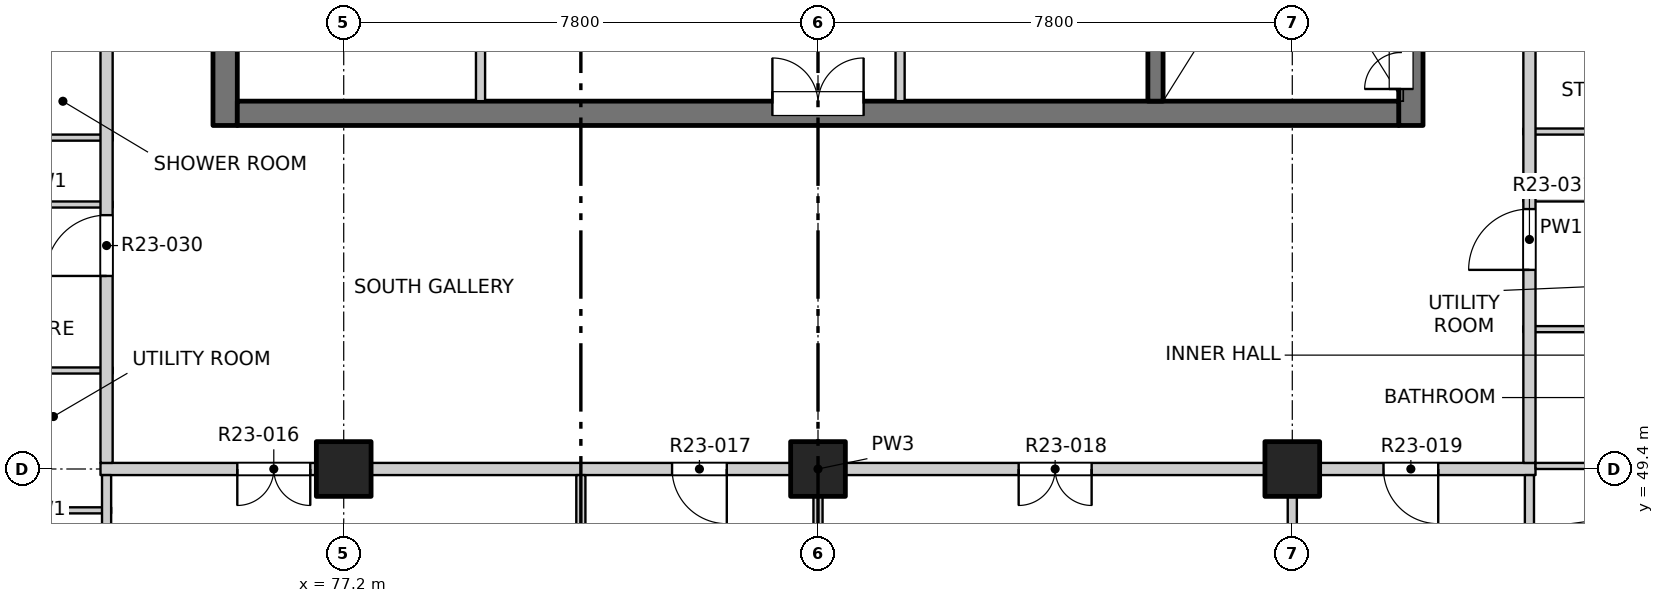
"""IFC4 building model, lengths in metres.
Left out: names, types, materials, properties, quantities, classifications, styles, units other than length and angle.
Written with IfcOpenShell. Run it as: python <this file> out.ifc"""

import sys

from ifc_helpers import new_model, si_unit, direction, frame, frame_2d, origin, origin_2d, place, context, subcontext, project, spatial, rectangle, extrude, element, fill, save


model = new_model("IFC4")
c1 = context("Model", 3, precision=1e-05, world=origin(), true_north=direction((0.0, 1.0)))
c2 = subcontext(c1, "Body", "Model", "MODEL_VIEW")
j1 = project(units=[si_unit("LENGTHUNIT", "METRE"), si_unit("PLANEANGLEUNIT", "RADIAN")], contexts=[c1])
p1 = place(None, origin())
s1 = spatial("IfcSite", under=j1, at=p1, CompositionType="ELEMENT")
p2 = place(p1, origin())
s2 = spatial("IfcBuilding", under=s1, at=p2, CompositionType="ELEMENT")
p3 = place(p2, frame((0.0, 0.0, 238.1)))
s3 = spatial("IfcBuildingStorey", under=s2, at=p3, CompositionType="ELEMENT", Elevation=238.1)
for number, where, z_axis, x_axis in (
    (1, (77.2, 49.4, -0.25), (0.0, 0.0, 1.0), (1.0, 0.0, 0.0)),
    (2, (85.0, 49.4, -0.25), (0.0, 0.0, 1.0), (1.0, 0.0, 0.0)),
    (3, (92.8, 49.4, -0.25), (0.0, 0.0, 1.0), (1.0, 0.0, 0.0)),
):
    element("IfcColumn", number, at=place(p3, frame(where, z_axis=z_axis, x_axis=x_axis)), inside=s3, PredefinedType="COLUMN", context=c2, shape_type="SweptSolid", body=[
        extrude(rectangle(XDim=0.9, YDim=0.9, at=origin_2d()), origin(), (0.0, 0.0, 1.0), 3.35),
    ])
p4 = place(p3, frame((75.25, 55.05, -0.25), z_axis=(0.0, 0.0, 1.0), x_axis=(0.0, 1.0, 0.0)))
e4 = element("IfcWall", 4, at=p4, inside=s3, PredefinedType="SOLIDWALL", context=c2, shape_type="SweptSolid", body=[
    extrude(rectangle(XDim=22.25, YDim=0.4, at=frame_2d((11.125, 0.0))), origin(), (0.0, 0.0, 1.0), 3.35),
])
p5 = place(p4, frame((7.4, 0.0, 0.25)))
e5 = element("IfcOpeningElement", 5, at=p5, cuts=e4, PredefinedType="OPENING", context=c2, shape_type="SweptSolid", body=[
    extrude(rectangle(XDim=0.9, YDim=2.1, at=frame_2d((0.45, 1.05))), frame((0.0, 0.21, 0.0), z_axis=(0.0, -1.0, 0.0), x_axis=(1.0, 0.0, 0.0)), (0.0, 0.0, 1.0), 0.42),
])
p6 = place(p4, frame((12.05, 0.0, 0.25)))
e6 = element("IfcOpeningElement", 6, at=p6, cuts=e4, PredefinedType="OPENING", context=c2, shape_type="SweptSolid", body=[
    extrude(rectangle(XDim=0.9, YDim=2.1, at=frame_2d((0.45, 1.05))), frame((0.0, 0.21, 0.0), z_axis=(0.0, -1.0, 0.0), x_axis=(1.0, 0.0, 0.0)), (0.0, 0.0, 1.0), 0.42),
])
p7 = place(p4, frame((16.55, 0.0, 0.25)))
e7 = element("IfcOpeningElement", 7, at=p7, cuts=e4, PredefinedType="OPENING", context=c2, shape_type="SweptSolid", body=[
    extrude(rectangle(XDim=0.9, YDim=2.1, at=frame_2d((0.45, 1.05))), frame((0.0, 0.21, 0.0), z_axis=(0.0, -1.0, 0.0), x_axis=(1.0, 0.0, 0.0)), (0.0, 0.0, 1.0), 0.42),
])
p8 = place(p4, frame((20.0, 0.0, 0.25)))
e8 = element("IfcOpeningElement", 8, at=p8, cuts=e4, PredefinedType="OPENING", context=c2, shape_type="SweptSolid", body=[
    extrude(rectangle(XDim=0.9, YDim=2.1, at=frame_2d((0.45, 1.05))), frame((0.0, 0.21, 0.0), z_axis=(0.0, -1.0, 0.0), x_axis=(1.0, 0.0, 0.0)), (0.0, 0.0, 1.0), 0.42),
])
p9 = place(p3, frame((94.75, 55.05, -0.25), z_axis=(0.0, 0.0, 1.0), x_axis=(0.0, 1.0, 0.0)))
e9 = element("IfcWall", 9, at=p9, inside=s3, PredefinedType="SOLIDWALL", context=c2, shape_type="SweptSolid", body=[
    extrude(rectangle(XDim=6.9, YDim=0.4, at=frame_2d((3.45, 0.0))), origin(), (0.0, 0.0, 1.0), 3.35),
])
p10 = place(p9, frame((0.6, 0.0, 0.25)))
e10 = element("IfcOpeningElement", 10, at=p10, cuts=e9, PredefinedType="OPENING", context=c2, shape_type="SweptSolid", body=[
    extrude(rectangle(XDim=1.2, YDim=2.1, at=frame_2d((0.6, 1.05))), frame((0.0, 0.21, 0.0), z_axis=(0.0, -1.0, 0.0), x_axis=(1.0, 0.0, 0.0)), (0.0, 0.0, 1.0), 0.42),
])
p11 = place(p3, frame((75.45, 55.25, -0.25), z_axis=(0.0, 0.0, 1.0), x_axis=(1.0, 0.0, 0.0)))
e11 = element("IfcWall", 11, at=p11, inside=s3, PredefinedType="SOLIDWALL", context=c2, shape_type="SweptSolid", body=[
    extrude(rectangle(XDim=19.1, YDim=0.4, at=frame_2d((9.55, 0.0))), origin(), (0.0, 0.0, 1.0), 3.35),
])
p12 = place(p11, frame((8.8, 0.0, 0.25)))
e12 = element("IfcOpeningElement", 12, at=p12, cuts=e11, PredefinedType="OPENING", context=c2, shape_type="SweptSolid", body=[
    extrude(rectangle(XDim=1.5, YDim=2.1, at=frame_2d((0.75, 1.05))), frame((0.0, 0.21, 0.0), z_axis=(0.0, -1.0, 0.0), x_axis=(1.0, 0.0, 0.0)), (0.0, 0.0, 1.0), 0.42),
])
p13 = place(p3, frame((90.55, 55.45, -0.25), z_axis=(0.0, 0.0, 1.0), x_axis=(0.0, 1.0, 0.0)))
e13 = element("IfcWall", 13, at=p13, inside=s3, PredefinedType="SOLIDWALL", context=c2, shape_type="SweptSolid", body=[
    extrude(rectangle(XDim=6.5, YDim=0.25, at=frame_2d((3.25, 0.0))), origin(), (0.0, 0.0, 1.0), 3.35),
])
p14 = place(p3, frame((71.18, 48.72, 0.0), z_axis=(0.0, 0.0, 1.0), x_axis=(1.0, 0.0, 0.0)))
e14 = element("IfcWall", 14, at=p14, inside=s3, PredefinedType="PARTITIONING", context=c2, shape_type="SweptSolid", body=[
    extrude(rectangle(XDim=2.195, YDim=0.1, at=frame_2d((1.097, 0.0))), origin(), (0.0, 0.0, 1.0), 3.1),
])
p15 = place(p3, frame((73.2, 49.4, 0.0), z_axis=(0.0, 0.0, 1.0), x_axis=(1.0, 0.0, 0.0)))
e15 = element("IfcWall", 15, at=p15, inside=s3, PredefinedType="PARTITIONING", context=c2, shape_type="SweptSolid", body=[
    extrude(rectangle(XDim=23.6, YDim=0.2, at=frame_2d((11.8, 0.0))), origin(), (0.0, 0.0, 1.0), 3.1),
])
p16 = place(p15, frame((2.25, 0.0, 0.0)))
e16 = element("IfcOpeningElement", 16, at=p16, cuts=e15, PredefinedType="OPENING", context=c2, shape_type="SweptSolid", body=[
    extrude(rectangle(XDim=1.2, YDim=2.1, at=frame_2d((0.6, 1.05))), frame((0.0, 0.11, 0.0), z_axis=(0.0, -1.0, 0.0), x_axis=(1.0, 0.0, 0.0)), (0.0, 0.0, 1.0), 0.22),
])
p17 = place(p15, frame((9.4, 0.0, 0.0)))
e17 = element("IfcOpeningElement", 17, at=p17, cuts=e15, PredefinedType="OPENING", context=c2, shape_type="SweptSolid", body=[
    extrude(rectangle(XDim=0.9, YDim=2.1, at=frame_2d((0.45, 1.05))), frame((0.0, 0.11, 0.0), z_axis=(0.0, -1.0, 0.0), x_axis=(1.0, 0.0, 0.0)), (0.0, 0.0, 1.0), 0.22),
])
p18 = place(p15, frame((15.1, 0.0, 0.0)))
e18 = element("IfcOpeningElement", 18, at=p18, cuts=e15, PredefinedType="OPENING", context=c2, shape_type="SweptSolid", body=[
    extrude(rectangle(XDim=1.2, YDim=2.1, at=frame_2d((0.6, 1.05))), frame((0.0, 0.11, 0.0), z_axis=(0.0, -1.0, 0.0), x_axis=(1.0, 0.0, 0.0)), (0.0, 0.0, 1.0), 0.22),
])
p19 = place(p15, frame((21.1, 0.0, 0.0)))
e19 = element("IfcOpeningElement", 19, at=p19, cuts=e15, PredefinedType="OPENING", context=c2, shape_type="SweptSolid", body=[
    extrude(rectangle(XDim=0.9, YDim=2.1, at=frame_2d((0.45, 1.05))), frame((0.0, 0.11, 0.0), z_axis=(0.0, -1.0, 0.0), x_axis=(1.0, 0.0, 0.0)), (0.0, 0.0, 1.0), 0.22),
])
p20 = place(p3, frame((96.8, 49.45, 0.0), z_axis=(0.0, 0.0, 1.0), x_axis=(1.0, 0.0, 0.0)))
e20 = element("IfcWall", 20, at=p20, inside=s3, PredefinedType="PARTITIONING", context=c2, shape_type="SweptSolid", body=[
    extrude(rectangle(XDim=2.02, YDim=0.1, at=frame_2d((1.01, 0.0))), origin(), (0.0, 0.0, 1.0), 3.1),
])
for number, where, z_axis, x_axis in (
    (21, (71.18, 51.02, 0.0), (0.0, 0.0, 1.0), (1.0, 0.0, 0.0)),
    (22, (96.6, 51.7, 0.0), (0.0, 0.0, 1.0), (1.0, 0.0, 0.0)),
    (23, (71.18, 53.75, 0.0), (0.0, 0.0, 1.0), (1.0, 0.0, 0.0)),
    (24, (96.6, 53.85, 0.0), (0.0, 0.0, 1.0), (1.0, 0.0, 0.0)),
    (25, (71.18, 54.85, 0.0), (0.0, 0.0, 1.0), (1.0, 0.0, 0.0)),
    (26, (96.6, 54.95, 0.0), (0.0, 0.0, 1.0), (1.0, 0.0, 0.0)),
):
    element("IfcWall", number, at=place(p3, frame(where, z_axis=z_axis, x_axis=x_axis)), inside=s3, PredefinedType="PARTITIONING", context=c2, shape_type="SweptSolid", body=[
        extrude(rectangle(XDim=2.22, YDim=0.1, at=frame_2d((1.11, 0.0))), origin(), (0.0, 0.0, 1.0), 3.1),
    ])
p21 = place(p3, frame((73.3, 41.9, 0.0), z_axis=(0.0, 0.0, 1.0), x_axis=(0.0, 1.0, 0.0)))
e27 = element("IfcWall", 27, at=p21, inside=s3, PredefinedType="PARTITIONING", context=c2, shape_type="SweptSolid", body=[
    extrude(rectangle(XDim=7.4, YDim=0.15, at=frame_2d((3.7, 0.0))), origin(), (0.0, 0.0, 1.0), 3.1),
])
p22 = place(p3, frame((73.3, 49.5, 0.0), z_axis=(0.0, 0.0, 1.0), x_axis=(0.0, 1.0, 0.0)))
e28 = element("IfcWall", 28, at=p22, inside=s3, PredefinedType="PARTITIONING", context=c2, shape_type="SweptSolid", body=[
    extrude(rectangle(XDim=34.9, YDim=0.2, at=frame_2d((17.45, 0.0))), origin(), (0.0, 0.0, 1.0), 3.1),
])
p23 = place(p22, frame((3.075, 0.0, 0.0)))
e29 = element("IfcOpeningElement", 29, at=p23, cuts=e28, PredefinedType="OPENING", context=c2, shape_type="SweptSolid", body=[
    extrude(rectangle(XDim=1.0, YDim=2.1, at=frame_2d((0.5, 1.05))), frame((0.0, 0.11, 0.0), z_axis=(0.0, -1.0, 0.0), x_axis=(1.0, 0.0, 0.0)), (0.0, 0.0, 1.0), 0.22),
])
p24 = place(p22, frame((14.575, 0.0, 0.0)))
e30 = element("IfcOpeningElement", 30, at=p24, cuts=e28, PredefinedType="OPENING", context=c2, shape_type="SweptSolid", body=[
    extrude(rectangle(XDim=1.0, YDim=2.1, at=frame_2d((0.5, 1.05))), frame((0.0, 0.11, 0.0), z_axis=(0.0, -1.0, 0.0), x_axis=(1.0, 0.0, 0.0)), (0.0, 0.0, 1.0), 0.22),
])
p25 = place(p22, frame((33.625, 0.0, 0.0)))
e31 = element("IfcOpeningElement", 31, at=p25, cuts=e28, PredefinedType="OPENING", context=c2, shape_type="SweptSolid", body=[
    extrude(rectangle(XDim=1.0, YDim=2.1, at=frame_2d((0.5, 1.05))), frame((0.0, 0.11, 0.0), z_axis=(0.0, -1.0, 0.0), x_axis=(1.0, 0.0, 0.0)), (0.0, 0.0, 1.0), 0.22),
])
p26 = place(p3, frame((79.45, 55.45, 0.0), z_axis=(0.0, 0.0, 1.0), x_axis=(0.0, 1.0, 0.0)))
e32 = element("IfcWall", 32, at=p26, inside=s3, PredefinedType="PARTITIONING", context=c2, shape_type="SweptSolid", body=[
    extrude(rectangle(XDim=5.45, YDim=0.15, at=frame_2d((2.725, 0.0))), origin(), (0.0, 0.0, 1.0), 3.1),
])
p27 = place(p26, frame((2.25, 0.0, 0.0)))
e33 = element("IfcOpeningElement", 33, at=p27, cuts=e32, PredefinedType="OPENING", context=c2, shape_type="SweptSolid", body=[
    extrude(rectangle(XDim=0.9, YDim=2.1, at=frame_2d((0.45, 1.05))), frame((0.0, 0.085, 0.0), z_axis=(0.0, -1.0, 0.0), x_axis=(1.0, 0.0, 0.0)), (0.0, 0.0, 1.0), 0.17),
])
for number, where, z_axis, x_axis in (
    (34, (81.1, 41.9, 0.0), (0.0, 0.0, 1.0), (0.0, 1.0, 0.0)),
    (35, (85.0, 41.9, 0.0), (0.0, 0.0, 1.0), (0.0, 1.0, 0.0)),
):
    element("IfcWall", number, at=place(p3, frame(where, z_axis=z_axis, x_axis=x_axis)), inside=s3, PredefinedType="PARTITIONING", context=c2, shape_type="SweptSolid", body=[
        extrude(rectangle(XDim=7.4, YDim=0.15, at=frame_2d((3.7, 0.0))), origin(), (0.0, 0.0, 1.0), 3.1),
    ])
p28 = place(p3, frame((86.35, 55.45, 0.0), z_axis=(0.0, 0.0, 1.0), x_axis=(0.0, 1.0, 0.0)))
e36 = element("IfcWall", 36, at=p28, inside=s3, PredefinedType="PARTITIONING", context=c2, shape_type="SweptSolid", body=[
    extrude(rectangle(XDim=5.575, YDim=0.15, at=frame_2d((2.788, 0.0))), origin(), (0.0, 0.0, 1.0), 3.1),
])
p29 = place(p28, frame((2.25, 0.0, 0.0)))
e37 = element("IfcOpeningElement", 37, at=p29, cuts=e36, PredefinedType="OPENING", context=c2, shape_type="SweptSolid", body=[
    extrude(rectangle(XDim=0.9, YDim=2.1, at=frame_2d((0.45, 1.05))), frame((0.0, 0.085, 0.0), z_axis=(0.0, -1.0, 0.0), x_axis=(1.0, 0.0, 0.0)), (0.0, 0.0, 1.0), 0.17),
])
for number, where, z_axis, x_axis in (
    (38, (92.8, 41.9, 0.0), (0.0, 0.0, 1.0), (0.0, 1.0, 0.0)),
    (39, (96.7, 41.9, 0.0), (0.0, 0.0, 1.0), (0.0, 1.0, 0.0)),
):
    element("IfcWall", number, at=place(p3, frame(where, z_axis=z_axis, x_axis=x_axis)), inside=s3, PredefinedType="PARTITIONING", context=c2, shape_type="SweptSolid", body=[
        extrude(rectangle(XDim=7.4, YDim=0.15, at=frame_2d((3.7, 0.0))), origin(), (0.0, 0.0, 1.0), 3.1),
    ])
p30 = place(p3, frame((96.7, 49.5, 0.0), z_axis=(0.0, 0.0, 1.0), x_axis=(0.0, 1.0, 0.0)))
e40 = element("IfcWall", 40, at=p30, inside=s3, PredefinedType="PARTITIONING", context=c2, shape_type="SweptSolid", body=[
    extrude(rectangle(XDim=34.9, YDim=0.2, at=frame_2d((17.45, 0.0))), origin(), (0.0, 0.0, 1.0), 3.1),
])
p31 = place(p30, frame((3.175, 0.0, 0.0)))
e41 = element("IfcOpeningElement", 41, at=p31, cuts=e40, PredefinedType="OPENING", context=c2, shape_type="SweptSolid", body=[
    extrude(rectangle(XDim=1.0, YDim=2.1, at=frame_2d((0.5, 1.05))), frame((0.0, 0.11, 0.0), z_axis=(0.0, -1.0, 0.0), x_axis=(1.0, 0.0, 0.0)), (0.0, 0.0, 1.0), 0.22),
])
p32 = place(p30, frame((14.625, 0.0, 0.0)))
e42 = element("IfcOpeningElement", 42, at=p32, cuts=e40, PredefinedType="OPENING", context=c2, shape_type="SweptSolid", body=[
    extrude(rectangle(XDim=1.0, YDim=2.1, at=frame_2d((0.5, 1.05))), frame((0.0, 0.11, 0.0), z_axis=(0.0, -1.0, 0.0), x_axis=(1.0, 0.0, 0.0)), (0.0, 0.0, 1.0), 0.22),
])
p33 = place(p30, frame((30.175, 0.0, 0.0)))
e43 = element("IfcOpeningElement", 43, at=p33, cuts=e40, PredefinedType="OPENING", context=c2, shape_type="SweptSolid", body=[
    extrude(rectangle(XDim=1.0, YDim=2.1, at=frame_2d((0.5, 1.05))), frame((0.0, 0.11, 0.0), z_axis=(0.0, -1.0, 0.0), x_axis=(1.0, 0.0, 0.0)), (0.0, 0.0, 1.0), 0.22),
])
p34 = place(p16, origin())
e44 = element("IfcDoor", 44, at=p34, inside=s3, OperationType="DOUBLE_DOOR_SINGLE_SWING", PredefinedType="DOOR", context=c2, shape_type="SweptSolid", body=[
    extrude(rectangle(XDim=1.2, YDim=2.1, at=frame_2d((0.6, 1.05))), frame((0.0, 0.025, 0.0), z_axis=(0.0, -1.0, 0.0), x_axis=(1.0, 0.0, 0.0)), (0.0, 0.0, 1.0), 0.05),
])
fill(e16, e44)
p35 = place(p17, origin())
e45 = element("IfcDoor", 45, at=p35, inside=s3, OperationType="SINGLE_SWING_LEFT", PredefinedType="DOOR", context=c2, shape_type="SweptSolid", body=[
    extrude(rectangle(XDim=0.9, YDim=2.1, at=frame_2d((0.45, 1.05))), frame((0.0, 0.025, 0.0), z_axis=(0.0, -1.0, 0.0), x_axis=(1.0, 0.0, 0.0)), (0.0, 0.0, 1.0), 0.05),
])
fill(e17, e45)
p36 = place(p18, origin())
e46 = element("IfcDoor", 46, at=p36, inside=s3, OperationType="DOUBLE_DOOR_SINGLE_SWING", PredefinedType="DOOR", context=c2, shape_type="SweptSolid", body=[
    extrude(rectangle(XDim=1.2, YDim=2.1, at=frame_2d((0.6, 1.05))), frame((0.0, 0.025, 0.0), z_axis=(0.0, -1.0, 0.0), x_axis=(1.0, 0.0, 0.0)), (0.0, 0.0, 1.0), 0.05),
])
fill(e18, e46)
p37 = place(p19, origin())
e47 = element("IfcDoor", 47, at=p37, inside=s3, OperationType="SINGLE_SWING_LEFT", PredefinedType="DOOR", context=c2, shape_type="SweptSolid", body=[
    extrude(rectangle(XDim=0.9, YDim=2.1, at=frame_2d((0.45, 1.05))), frame((0.0, 0.025, 0.0), z_axis=(0.0, -1.0, 0.0), x_axis=(1.0, 0.0, 0.0)), (0.0, 0.0, 1.0), 0.05),
])
fill(e19, e47)
p38 = place(p23, origin())
e48 = element("IfcDoor", 48, at=p38, inside=s3, OperationType="SINGLE_SWING_LEFT", PredefinedType="DOOR", context=c2, shape_type="SweptSolid", body=[
    extrude(rectangle(XDim=1.0, YDim=2.1, at=frame_2d((0.5, 1.05))), frame((0.0, 0.025, 0.0), z_axis=(0.0, -1.0, 0.0), x_axis=(1.0, 0.0, 0.0)), (0.0, 0.0, 1.0), 0.05),
])
fill(e29, e48)
p39 = place(p31, origin())
e49 = element("IfcDoor", 49, at=p39, inside=s3, OperationType="SINGLE_SWING_RIGHT", PredefinedType="DOOR", context=c2, shape_type="SweptSolid", body=[
    extrude(rectangle(XDim=1.0, YDim=2.1, at=frame_2d((0.5, 1.05))), frame((0.0, 0.025, 0.0), z_axis=(0.0, -1.0, 0.0), x_axis=(1.0, 0.0, 0.0)), (0.0, 0.0, 1.0), 0.05),
])
fill(e41, e49)
p40 = place(p12, origin())
e50 = element("IfcDoor", 50, at=p40, inside=s3, OperationType="DOUBLE_DOOR_SINGLE_SWING", PredefinedType="DOOR", context=c2, shape_type="SweptSolid", body=[
    extrude(rectangle(XDim=1.5, YDim=2.1, at=frame_2d((0.75, 1.05))), frame((0.0, 0.185, 0.0), z_axis=(0.0, -1.0, 0.0), x_axis=(1.0, 0.0, 0.0)), (0.0, 0.0, 1.0), 0.05),
])
fill(e12, e50)
p41 = place(p10, origin())
e51 = element("IfcDoor", 51, at=p41, inside=s3, OperationType="DOUBLE_DOOR_SINGLE_SWING", PredefinedType="DOOR", context=c2, shape_type="SweptSolid", body=[
    extrude(rectangle(XDim=1.2, YDim=2.1, at=frame_2d((0.6, 1.05))), frame((0.0, 0.185, 0.0), z_axis=(0.0, -1.0, 0.0), x_axis=(1.0, 0.0, 0.0)), (0.0, 0.0, 1.0), 0.05),
])
fill(e10, e51)
save(model, sys.argv[1])
